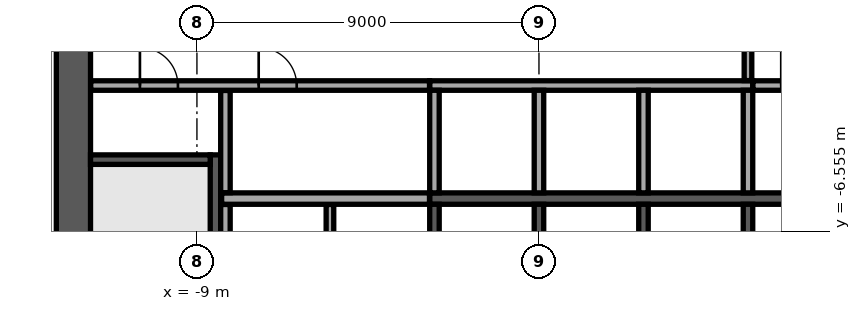
"""IFC4 building model, lengths in metres.
Left out: names, types, materials, properties, quantities, classifications, styles, units other than length and angle.
Written with IfcOpenShell. Run it as: python <this file> out.ifc"""

import sys

from ifc_helpers import new_model, si_unit, direction, frame, frame_2d, origin, place, context, subcontext, project, spatial, rectangle, extrude, element, fill, save


model = new_model("IFC4")
c1 = context("Model", 3, precision=1e-05, world=origin(), true_north=direction((0.0, 1.0)))
c2 = subcontext(c1, "Body", "Model", "MODEL_VIEW")
j1 = project(units=[si_unit("LENGTHUNIT", "METRE"), si_unit("PLANEANGLEUNIT", "RADIAN")], contexts=[c1])
p1 = place(None, origin())
s1 = spatial("IfcSite", under=j1, at=p1, CompositionType="ELEMENT")
p2 = place(p1, origin())
s2 = spatial("IfcBuilding", under=s1, at=p2, CompositionType="ELEMENT")
p3 = place(p2, frame((0.0, 0.0, 197.3)))
s3 = spatial("IfcBuildingStorey", under=s2, at=p3, CompositionType="ELEMENT", Elevation=197.3)
p4 = place(p3, frame((-12.25, -11.8, 0.0), z_axis=(0.0, 0.0, 1.0), x_axis=(0.0, 1.0, 0.0)))
e1 = element("IfcWall", 1, at=p4, inside=s3, PredefinedType="SHEAR", context=c2, shape_type="SweptSolid", body=[
    extrude(rectangle(XDim=23.6, YDim=0.9, at=frame_2d((11.8, 0.0))), origin(), (0.0, 0.0, 1.0), 3.62),
])
p5 = place(p4, frame((10.6, 0.0, 0.0)))
e2 = element("IfcOpeningElement", 2, at=p5, cuts=e1, PredefinedType="OPENING", context=c2, shape_type="SweptSolid", body=[
    extrude(rectangle(XDim=2.4, YDim=2.4, at=frame_2d((1.2, 1.2))), frame((0.0, 0.46, 0.0), z_axis=(0.0, -1.0, 0.0), x_axis=(1.0, 0.0, 0.0)), (0.0, 0.0, 1.0), 0.92),
])
p6 = place(p3, frame((-2.875, -5.7, 0.0), z_axis=(0.0, 0.0, 1.0), x_axis=(1.0, 0.0, 0.0)))
e3 = element("IfcWall", 3, at=p6, inside=s3, PredefinedType="SOLIDWALL", context=c2, shape_type="SweptSolid", body=[
    extrude(rectangle(XDim=11.25, YDim=0.3, at=frame_2d((5.625, 0.0))), origin(), (0.0, 0.0, 1.0), 3.62),
])
p7 = place(p3, frame((-2.875, -2.725, 0.0), z_axis=(0.0, 0.0, 1.0), x_axis=(1.0, 0.0, 0.0)))
e4 = element("IfcWall", 4, at=p7, inside=s3, PredefinedType="SOLIDWALL", context=c2, shape_type="SweptSolid", body=[
    extrude(rectangle(XDim=8.5, YDim=0.25, at=frame_2d((4.25, 0.0))), origin(), (0.0, 0.0, 1.0), 3.62),
])
for number, where, z_axis, x_axis in (
    (5, (-2.75, -5.55, 0.0), (0.0, 0.0, 1.0), (0.0, 1.0, 0.0)),
    (6, (0.0, -5.55, 0.0), (0.0, 0.0, 1.0), (0.0, 1.0, 0.0)),
    (7, (2.75, -5.55, 0.0), (0.0, 0.0, 1.0), (0.0, 1.0, 0.0)),
    (8, (5.5, -5.55, 0.0), (0.0, 0.0, 1.0), (0.0, 1.0, 0.0)),
    (9, (-2.75, -8.55, 0.0), (0.0, 0.0, 1.0), (0.0, 1.0, 0.0)),
    (10, (0.0, -8.55, 0.0), (0.0, 0.0, 1.0), (0.0, 1.0, 0.0)),
    (11, (2.75, -8.55, 0.0), (0.0, 0.0, 1.0), (0.0, 1.0, 0.0)),
    (12, (5.5, -8.55, 0.0), (0.0, 0.0, 1.0), (0.0, 1.0, 0.0)),
):
    element("IfcWall", number, at=place(p3, frame(where, z_axis=z_axis, x_axis=x_axis)), inside=s3, PredefinedType="SOLIDWALL", context=c2, shape_type="SweptSolid", body=[
        extrude(rectangle(XDim=2.7, YDim=0.25, at=frame_2d((1.35, 0.0))), origin(), (0.0, 0.0, 1.0), 3.62),
    ])
p8 = place(p3, frame((-8.512, -4.55, 0.0), z_axis=(0.0, 0.0, 1.0), x_axis=(0.0, -1.0, 0.0)))
e13 = element("IfcWall", 13, at=p8, inside=s3, PredefinedType="SOLIDWALL", context=c2, shape_type="SweptSolid", body=[
    extrude(rectangle(XDim=7.25, YDim=0.275, at=frame_2d((3.625, 0.0))), origin(), (0.0, 0.0, 1.0), 3.62),
])
p9 = place(p8, frame((6.0, 0.0, 0.0)))
e14 = element("IfcOpeningElement", 14, at=p9, cuts=e13, PredefinedType="OPENING", context=c2, shape_type="SweptSolid", body=[
    extrude(rectangle(XDim=1.0, YDim=2.1, at=frame_2d((0.5, 1.05))), frame((0.0, 0.147, 0.0), z_axis=(0.0, -1.0, 0.0), x_axis=(1.0, 0.0, 0.0)), (0.0, 0.0, 1.0), 0.295),
])
p10 = place(p3, frame((-8.65, -4.675, 0.0), z_axis=(0.0, 0.0, 1.0), x_axis=(-1.0, 0.0, 0.0)))
e15 = element("IfcWall", 15, at=p10, inside=s3, PredefinedType="SOLIDWALL", context=c2, shape_type="SweptSolid", body=[
    extrude(rectangle(XDim=3.15, YDim=0.25, at=frame_2d((1.575, 0.0))), origin(), (0.0, 0.0, 1.0), 3.62),
])
p11 = place(p3, frame((-8.25, -8.545, 0.0), z_axis=(0.0, 0.0, 1.0), x_axis=(0.0, 1.0, 0.0)))
e16 = element("IfcWall", 16, at=p11, inside=s3, PredefinedType="PARTITIONING", context=c2, shape_type="SweptSolid", body=[
    extrude(rectangle(XDim=2.69, YDim=0.25, at=frame_2d((1.345, 0.0))), origin(), (0.0, 0.0, 1.0), 3.62),
])
p12 = place(p3, frame((-5.5, -8.545, 0.0), z_axis=(0.0, 0.0, 1.0), x_axis=(0.0, 1.0, 0.0)))
e17 = element("IfcWall", 17, at=p12, inside=s3, PredefinedType="PARTITIONING", context=c2, shape_type="SweptSolid", body=[
    extrude(rectangle(XDim=2.69, YDim=0.2, at=frame_2d((1.345, 0.0))), origin(), (0.0, 0.0, 1.0), 3.62),
])
p13 = place(p3, frame((-8.35, -5.7, 0.0), z_axis=(0.0, 0.0, 1.0), x_axis=(1.0, 0.0, 0.0)))
e18 = element("IfcWall", 18, at=p13, inside=s3, PredefinedType="PARTITIONING", context=c2, shape_type="SweptSolid", body=[
    extrude(rectangle(XDim=5.47, YDim=0.3, at=frame_2d((2.735, 0.0))), origin(), (0.0, 0.0, 1.0), 3.62),
])
p14 = place(p3, frame((-8.25, -5.545, 0.0), z_axis=(0.0, 0.0, 1.0), x_axis=(0.0, 1.0, 0.0)))
e19 = element("IfcWall", 19, at=p14, inside=s3, PredefinedType="PARTITIONING", context=c2, shape_type="SweptSolid", body=[
    extrude(rectangle(XDim=2.69, YDim=0.25, at=frame_2d((1.345, 0.0))), origin(), (0.0, 0.0, 1.0), 3.62),
])
p15 = place(p3, frame((-11.795, -2.725, 0.0), z_axis=(0.0, 0.0, 1.0), x_axis=(1.0, 0.0, 0.0)))
e20 = element("IfcWall", 20, at=p15, inside=s3, PredefinedType="PARTITIONING", context=c2, shape_type="SweptSolid", body=[
    extrude(rectangle(XDim=8.915, YDim=0.25, at=frame_2d((4.458, 0.0))), origin(), (0.0, 0.0, 1.0), 3.62),
])
p16 = place(p15, frame((1.295, 0.0, 0.0)))
e21 = element("IfcOpeningElement", 21, at=p16, cuts=e20, PredefinedType="OPENING", context=c2, shape_type="SweptSolid", body=[
    extrude(rectangle(XDim=1.0, YDim=2.1, at=frame_2d((0.5, 1.05))), frame((0.0, 0.135, 0.0), z_axis=(0.0, -1.0, 0.0), x_axis=(1.0, 0.0, 0.0)), (0.0, 0.0, 1.0), 0.27),
])
p17 = place(p15, frame((4.42, 0.0, 0.0)))
e22 = element("IfcOpeningElement", 22, at=p17, cuts=e20, PredefinedType="OPENING", context=c2, shape_type="SweptSolid", body=[
    extrude(rectangle(XDim=1.0, YDim=2.1, at=frame_2d((0.5, 1.05))), frame((0.0, 0.135, 0.0), z_axis=(0.0, -1.0, 0.0), x_axis=(1.0, 0.0, 0.0)), (0.0, 0.0, 1.0), 0.27),
])
p18 = place(p3, frame((5.63, -2.725, 0.0), z_axis=(0.0, 0.0, 1.0), x_axis=(1.0, 0.0, 0.0)))
e23 = element("IfcWall", 23, at=p18, inside=s3, PredefinedType="PARTITIONING", context=c2, shape_type="SweptSolid", body=[
    extrude(rectangle(XDim=6.165, YDim=0.25, at=frame_2d((3.083, 0.0))), origin(), (0.0, 0.0, 1.0), 3.62),
])
p19 = place(p18, frame((0.745, 0.0, 0.0)))
e24 = element("IfcOpeningElement", 24, at=p19, cuts=e23, PredefinedType="OPENING", context=c2, shape_type="SweptSolid", body=[
    extrude(rectangle(XDim=1.0, YDim=2.1, at=frame_2d((0.5, 1.05))), frame((0.0, 0.135, 0.0), z_axis=(0.0, -1.0, 0.0), x_axis=(1.0, 0.0, 0.0)), (0.0, 0.0, 1.0), 0.27),
])
p20 = place(p18, frame((3.92, 0.0, 0.0)))
e25 = element("IfcOpeningElement", 25, at=p20, cuts=e23, PredefinedType="OPENING", context=c2, shape_type="SweptSolid", body=[
    extrude(rectangle(XDim=0.9, YDim=2.1, at=frame_2d((0.45, 1.05))), frame((0.0, 0.135, 0.0), z_axis=(0.0, -1.0, 0.0), x_axis=(1.0, 0.0, 0.0)), (0.0, 0.0, 1.0), 0.27),
])
p21 = place(p3, frame((5.5, -2.595, 0.0), z_axis=(0.0, 0.0, 1.0), x_axis=(0.0, 1.0, 0.0)))
e26 = element("IfcWall", 26, at=p21, inside=s3, PredefinedType="PARTITIONING", context=c2, shape_type="SweptSolid", body=[
    extrude(rectangle(XDim=5.19, YDim=0.2, at=frame_2d((2.595, 0.0))), origin(), (0.0, 0.0, 1.0), 3.62),
])
p22 = place(p21, frame((1.395, 0.0, 0.0)))
e27 = element("IfcOpeningElement", 27, at=p22, cuts=e26, PredefinedType="OPENING", context=c2, shape_type="SweptSolid", body=[
    extrude(rectangle(XDim=2.4, YDim=2.4, at=frame_2d((1.2, 1.2))), frame((0.0, 0.11, 0.0), z_axis=(0.0, -1.0, 0.0), x_axis=(1.0, 0.0, 0.0)), (0.0, 0.0, 1.0), 0.22),
])
p23 = place(p3, frame((-35.02, -5.994, 0.0), z_axis=(0.0, 0.0, 1.0), x_axis=(0.682002361324, -0.731349970362, 0.0)))
e28 = element("IfcWall", 28, at=p23, inside=s3, PredefinedType="STANDARD", context=c2, shape_type="SweptSolid", body=[
    extrude(rectangle(XDim=39.0, YDim=0.6, at=frame_2d((19.5, 0.0))), origin(), (0.0, 0.0, 1.0), 3.62),
])
p24 = place(p23, frame((1.217, 0.0, 0.9)))
e29 = element("IfcOpeningElement", 29, at=p24, cuts=e28, PredefinedType="OPENING", context=c2, shape_type="SweptSolid", body=[
    extrude(rectangle(XDim=1.9, YDim=2.1, at=frame_2d((0.95, 1.05))), frame((0.0, 0.31, 0.0), z_axis=(0.0, -1.0, 0.0), x_axis=(1.0, 0.0, 0.0)), (0.0, 0.0, 1.0), 0.62),
])
p25 = place(p23, frame((5.55, 0.0, 0.9)))
e30 = element("IfcOpeningElement", 30, at=p25, cuts=e28, PredefinedType="OPENING", context=c2, shape_type="SweptSolid", body=[
    extrude(rectangle(XDim=1.9, YDim=2.1, at=frame_2d((0.95, 1.05))), frame((0.0, 0.31, 0.0), z_axis=(0.0, -1.0, 0.0), x_axis=(1.0, 0.0, 0.0)), (0.0, 0.0, 1.0), 0.62),
])
p26 = place(p23, frame((9.883, 0.0, 0.9)))
e31 = element("IfcOpeningElement", 31, at=p26, cuts=e28, PredefinedType="OPENING", context=c2, shape_type="SweptSolid", body=[
    extrude(rectangle(XDim=1.9, YDim=2.1, at=frame_2d((0.95, 1.05))), frame((0.0, 0.31, 0.0), z_axis=(0.0, -1.0, 0.0), x_axis=(1.0, 0.0, 0.0)), (0.0, 0.0, 1.0), 0.62),
])
p27 = place(p23, frame((14.217, 0.0, 0.9)))
e32 = element("IfcOpeningElement", 32, at=p27, cuts=e28, PredefinedType="OPENING", context=c2, shape_type="SweptSolid", body=[
    extrude(rectangle(XDim=1.9, YDim=2.1, at=frame_2d((0.95, 1.05))), frame((0.0, 0.31, 0.0), z_axis=(0.0, -1.0, 0.0), x_axis=(1.0, 0.0, 0.0)), (0.0, 0.0, 1.0), 0.62),
])
p28 = place(p23, frame((18.55, 0.0, 0.9)))
e33 = element("IfcOpeningElement", 33, at=p28, cuts=e28, PredefinedType="OPENING", context=c2, shape_type="SweptSolid", body=[
    extrude(rectangle(XDim=1.9, YDim=2.1, at=frame_2d((0.95, 1.05))), frame((0.0, 0.31, 0.0), z_axis=(0.0, -1.0, 0.0), x_axis=(1.0, 0.0, 0.0)), (0.0, 0.0, 1.0), 0.62),
])
p29 = place(p23, frame((22.883, 0.0, 0.9)))
e34 = element("IfcOpeningElement", 34, at=p29, cuts=e28, PredefinedType="OPENING", context=c2, shape_type="SweptSolid", body=[
    extrude(rectangle(XDim=1.9, YDim=2.1, at=frame_2d((0.95, 1.05))), frame((0.0, 0.31, 0.0), z_axis=(0.0, -1.0, 0.0), x_axis=(1.0, 0.0, 0.0)), (0.0, 0.0, 1.0), 0.62),
])
p30 = place(p23, frame((27.217, 0.0, 0.9)))
e35 = element("IfcOpeningElement", 35, at=p30, cuts=e28, PredefinedType="OPENING", context=c2, shape_type="SweptSolid", body=[
    extrude(rectangle(XDim=1.9, YDim=2.1, at=frame_2d((0.95, 1.05))), frame((0.0, 0.31, 0.0), z_axis=(0.0, -1.0, 0.0), x_axis=(1.0, 0.0, 0.0)), (0.0, 0.0, 1.0), 0.62),
])
p31 = place(p23, frame((31.55, 0.0, 0.9)))
e36 = element("IfcOpeningElement", 36, at=p31, cuts=e28, PredefinedType="OPENING", context=c2, shape_type="SweptSolid", body=[
    extrude(rectangle(XDim=1.9, YDim=2.1, at=frame_2d((0.95, 1.05))), frame((0.0, 0.31, 0.0), z_axis=(0.0, -1.0, 0.0), x_axis=(1.0, 0.0, 0.0)), (0.0, 0.0, 1.0), 0.62),
])
p32 = place(p23, frame((35.883, 0.0, 0.9)))
e37 = element("IfcOpeningElement", 37, at=p32, cuts=e28, PredefinedType="OPENING", context=c2, shape_type="SweptSolid", body=[
    extrude(rectangle(XDim=1.9, YDim=2.1, at=frame_2d((0.95, 1.05))), frame((0.0, 0.31, 0.0), z_axis=(0.0, -1.0, 0.0), x_axis=(1.0, 0.0, 0.0)), (0.0, 0.0, 1.0), 0.62),
])
p33 = place(p3, frame((-1.073, -34.773, 0.0), z_axis=(0.0, 0.0, 1.0), x_axis=(0.731351780381, 0.682000420333, 0.0)))
e38 = element("IfcWall", 38, at=p33, inside=s3, PredefinedType="STANDARD", context=c2, shape_type="SweptSolid", body=[
    extrude(rectangle(XDim=49.0, YDim=0.6, at=frame_2d((24.5, 0.0))), origin(), (0.0, 0.0, 1.0), 3.62),
])
p34 = place(p33, frame((1.227, 0.0, 0.9)))
e39 = element("IfcOpeningElement", 39, at=p34, cuts=e38, PredefinedType="OPENING", context=c2, shape_type="SweptSolid", body=[
    extrude(rectangle(XDim=2.0, YDim=2.1, at=frame_2d((1.0, 1.05))), frame((0.0, 0.31, 0.0), z_axis=(0.0, -1.0, 0.0), x_axis=(1.0, 0.0, 0.0)), (0.0, 0.0, 1.0), 0.62),
])
p35 = place(p33, frame((5.682, 0.0, 0.9)))
e40 = element("IfcOpeningElement", 40, at=p35, cuts=e38, PredefinedType="OPENING", context=c2, shape_type="SweptSolid", body=[
    extrude(rectangle(XDim=2.0, YDim=2.1, at=frame_2d((1.0, 1.05))), frame((0.0, 0.31, 0.0), z_axis=(0.0, -1.0, 0.0), x_axis=(1.0, 0.0, 0.0)), (0.0, 0.0, 1.0), 0.62),
])
p36 = place(p33, frame((14.591, 0.0, 0.9)))
e41 = element("IfcOpeningElement", 41, at=p36, cuts=e38, PredefinedType="OPENING", context=c2, shape_type="SweptSolid", body=[
    extrude(rectangle(XDim=2.0, YDim=2.1, at=frame_2d((1.0, 1.05))), frame((0.0, 0.31, 0.0), z_axis=(0.0, -1.0, 0.0), x_axis=(1.0, 0.0, 0.0)), (0.0, 0.0, 1.0), 0.62),
])
p37 = place(p33, frame((19.045, 0.0, 0.9)))
e42 = element("IfcOpeningElement", 42, at=p37, cuts=e38, PredefinedType="OPENING", context=c2, shape_type="SweptSolid", body=[
    extrude(rectangle(XDim=2.0, YDim=2.1, at=frame_2d((1.0, 1.05))), frame((0.0, 0.31, 0.0), z_axis=(0.0, -1.0, 0.0), x_axis=(1.0, 0.0, 0.0)), (0.0, 0.0, 1.0), 0.62),
])
p38 = place(p33, frame((23.5, 0.0, 0.9)))
e43 = element("IfcOpeningElement", 43, at=p38, cuts=e38, PredefinedType="OPENING", context=c2, shape_type="SweptSolid", body=[
    extrude(rectangle(XDim=2.0, YDim=2.1, at=frame_2d((1.0, 1.05))), frame((0.0, 0.31, 0.0), z_axis=(0.0, -1.0, 0.0), x_axis=(1.0, 0.0, 0.0)), (0.0, 0.0, 1.0), 0.62),
])
p39 = place(p33, frame((27.955, 0.0, 0.9)))
e44 = element("IfcOpeningElement", 44, at=p39, cuts=e38, PredefinedType="OPENING", context=c2, shape_type="SweptSolid", body=[
    extrude(rectangle(XDim=2.0, YDim=2.1, at=frame_2d((1.0, 1.05))), frame((0.0, 0.31, 0.0), z_axis=(0.0, -1.0, 0.0), x_axis=(1.0, 0.0, 0.0)), (0.0, 0.0, 1.0), 0.62),
])
p40 = place(p33, frame((32.409, 0.0, 0.9)))
e45 = element("IfcOpeningElement", 45, at=p40, cuts=e38, PredefinedType="OPENING", context=c2, shape_type="SweptSolid", body=[
    extrude(rectangle(XDim=2.0, YDim=2.1, at=frame_2d((1.0, 1.05))), frame((0.0, 0.31, 0.0), z_axis=(0.0, -1.0, 0.0), x_axis=(1.0, 0.0, 0.0)), (0.0, 0.0, 1.0), 0.62),
])
p41 = place(p33, frame((36.864, 0.0, 0.9)))
e46 = element("IfcOpeningElement", 46, at=p41, cuts=e38, PredefinedType="OPENING", context=c2, shape_type="SweptSolid", body=[
    extrude(rectangle(XDim=2.0, YDim=2.1, at=frame_2d((1.0, 1.05))), frame((0.0, 0.31, 0.0), z_axis=(0.0, -1.0, 0.0), x_axis=(1.0, 0.0, 0.0)), (0.0, 0.0, 1.0), 0.62),
])
p42 = place(p33, frame((41.318, 0.0, 0.9)))
e47 = element("IfcOpeningElement", 47, at=p42, cuts=e38, PredefinedType="OPENING", context=c2, shape_type="SweptSolid", body=[
    extrude(rectangle(XDim=2.0, YDim=2.1, at=frame_2d((1.0, 1.05))), frame((0.0, 0.31, 0.0), z_axis=(0.0, -1.0, 0.0), x_axis=(1.0, 0.0, 0.0)), (0.0, 0.0, 1.0), 0.62),
])
p43 = place(p33, frame((45.773, 0.0, 0.9)))
e48 = element("IfcOpeningElement", 48, at=p43, cuts=e38, PredefinedType="OPENING", context=c2, shape_type="SweptSolid", body=[
    extrude(rectangle(XDim=2.0, YDim=2.1, at=frame_2d((1.0, 1.05))), frame((0.0, 0.31, 0.0), z_axis=(0.0, -1.0, 0.0), x_axis=(1.0, 0.0, 0.0)), (0.0, 0.0, 1.0), 0.62),
])
p44 = place(p3, frame((1.576, -24.793, 0.0), z_axis=(0.0, 0.0, 1.0), x_axis=(0.731351215564, 0.68200102602, 0.0)))
e49 = element("IfcWall", 49, at=p44, inside=s3, PredefinedType="PARTITIONING", context=c2, shape_type="SweptSolid", body=[
    extrude(rectangle(XDim=31.513, YDim=0.15, at=frame_2d((15.757, 0.0))), origin(), (0.0, 0.0, 1.0), 3.17),
])
p45 = place(p44, frame((2.3, 0.0, 0.0)))
e50 = element("IfcOpeningElement", 50, at=p45, cuts=e49, PredefinedType="OPENING", context=c2, shape_type="SweptSolid", body=[
    extrude(rectangle(XDim=1.8, YDim=2.1, at=frame_2d((0.9, 1.05))), frame((0.0, 0.085, 0.0), z_axis=(0.0, -1.0, 0.0), x_axis=(1.0, 0.0, 0.0)), (0.0, 0.0, 1.0), 0.17),
])
p46 = place(p44, frame((11.883, 0.0, 0.0)))
e51 = element("IfcOpeningElement", 51, at=p46, cuts=e49, PredefinedType="OPENING", context=c2, shape_type="SweptSolid", body=[
    extrude(rectangle(XDim=1.0, YDim=2.1, at=frame_2d((0.5, 1.05))), frame((0.0, 0.085, 0.0), z_axis=(0.0, -1.0, 0.0), x_axis=(1.0, 0.0, 0.0)), (0.0, 0.0, 1.0), 0.17),
])
p47 = place(p44, frame((15.726, 0.0, 0.0)))
e52 = element("IfcOpeningElement", 52, at=p47, cuts=e49, PredefinedType="OPENING", context=c2, shape_type="SweptSolid", body=[
    extrude(rectangle(XDim=1.0, YDim=2.1, at=frame_2d((0.5, 1.05))), frame((0.0, 0.085, 0.0), z_axis=(0.0, -1.0, 0.0), x_axis=(1.0, 0.0, 0.0)), (0.0, 0.0, 1.0), 0.17),
])
p48 = place(p16, origin())
e53 = element("IfcDoor", 53, at=p48, inside=s3, OperationType="SINGLE_SWING_LEFT", PredefinedType="DOOR", context=c2, shape_type="SweptSolid", body=[
    extrude(rectangle(XDim=1.0, YDim=2.1, at=frame_2d((0.5, 1.05))), frame((0.0, 0.025, 0.0), z_axis=(0.0, -1.0, 0.0), x_axis=(1.0, 0.0, 0.0)), (0.0, 0.0, 1.0), 0.05),
])
fill(e21, e53)
p49 = place(p17, origin())
e54 = element("IfcDoor", 54, at=p49, inside=s3, OperationType="SINGLE_SWING_LEFT", PredefinedType="DOOR", context=c2, shape_type="SweptSolid", body=[
    extrude(rectangle(XDim=1.0, YDim=2.1, at=frame_2d((0.5, 1.05))), frame((0.0, 0.025, 0.0), z_axis=(0.0, -1.0, 0.0), x_axis=(1.0, 0.0, 0.0)), (0.0, 0.0, 1.0), 0.05),
])
fill(e22, e54)
save(model, sys.argv[1])
